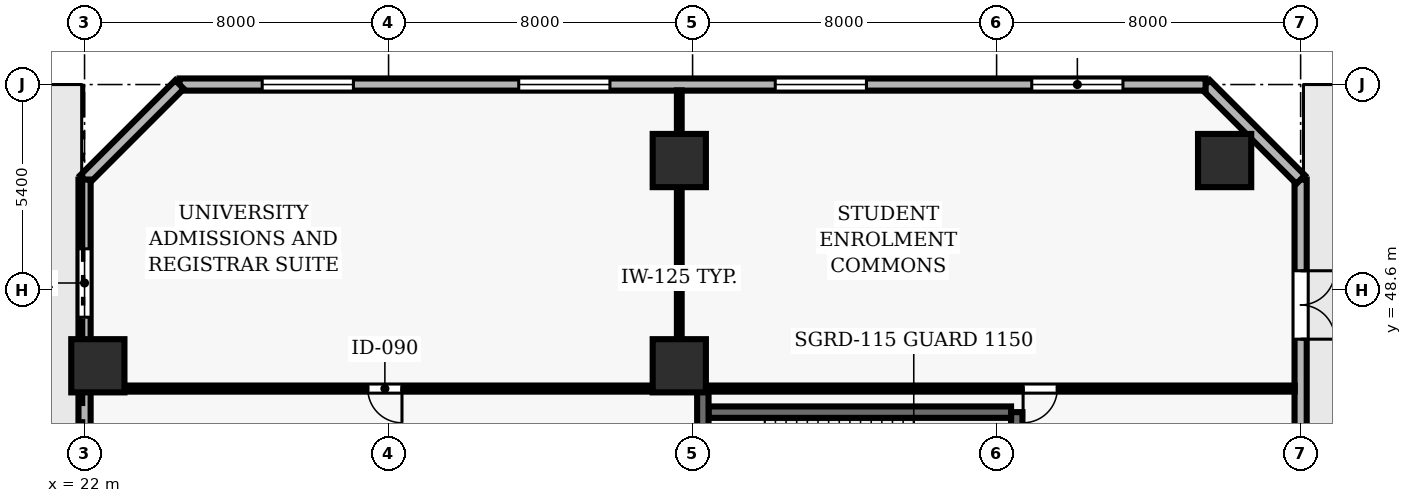
"""IFC4 building model, lengths in metres.
Left out: names, types, materials, properties, quantities, classifications, styles, units other than length and angle.
Written with IfcOpenShell. Run it as: python <this file> out.ifc"""

import sys

from ifc_helpers import new_model, si_unit, direction, frame, frame_2d, origin, origin_2d, place, context, subcontext, project, spatial, rectangle, extrude, element, fill, save


model = new_model("IFC4")
c1 = context("Model", 3, precision=1e-05, world=origin(), true_north=direction((0.0, 1.0)))
c2 = subcontext(c1, "Body", "Model", "MODEL_VIEW")
j1 = project(units=[si_unit("LENGTHUNIT", "METRE"), si_unit("PLANEANGLEUNIT", "RADIAN")], contexts=[c1])
p1 = place(None, origin())
s1 = spatial("IfcSite", under=j1, at=p1, CompositionType="ELEMENT")
p2 = place(p1, origin())
s2 = spatial("IfcBuilding", under=s1, at=p2, CompositionType="ELEMENT")
p3 = place(p2, origin())
s3 = spatial("IfcBuildingStorey", under=s2, at=p3, CompositionType="ELEMENT", Elevation=0.0)
for number, where, z_axis, x_axis in (
    (1, (22.35, 46.6, 0.0), (0.0, 0.0, 1.0), (1.0, 0.0, 0.0)),
    (2, (37.65, 46.6, 0.0), (0.0, 0.0, 1.0), (1.0, 0.0, 0.0)),
    (3, (37.65, 52.0, 0.0), (0.0, 0.0, 1.0), (1.0, 0.0, 0.0)),
    (4, (52.0, 52.0, 0.0), (0.0, 0.0, 1.0), (1.0, 0.0, 0.0)),
):
    element("IfcColumn", number, at=place(p3, frame(where, z_axis=z_axis, x_axis=x_axis)), inside=s3, PredefinedType="COLUMN", context=c2, shape_type="SweptSolid", body=[
        extrude(rectangle(XDim=1.4, YDim=1.4, at=origin_2d()), origin(), (0.0, 0.0, 1.0), 5.2),
    ])
p4 = place(p3, frame((54.0, 32.0, 0.0), z_axis=(0.0, 0.0, 1.0), x_axis=(0.0, 1.0, 0.0)))
e5 = element("IfcWall", 5, at=p4, inside=s3, PredefinedType="SOLIDWALL", context=c2, shape_type="SweptSolid", body=[
    extrude(rectangle(XDim=19.5, YDim=0.32, at=frame_2d((9.75, 0.0))), origin(), (0.0, 0.0, 1.0), 4.92),
])
p5 = place(p4, frame((1.3, 0.0, 0.0)))
e6 = element("IfcOpeningElement", 6, at=p5, cuts=e5, PredefinedType="OPENING", context=c2, shape_type="SweptSolid", body=[
    extrude(rectangle(XDim=1.8, YDim=2.4, at=frame_2d((0.9, 1.2))), frame((0.0, 0.17, 0.0), z_axis=(0.0, -1.0, 0.0), x_axis=(1.0, 0.0, 0.0)), (0.0, 0.0, 1.0), 0.34),
])
p6 = place(p4, frame((15.3, 0.0, 0.0)))
e7 = element("IfcOpeningElement", 7, at=p6, cuts=e5, PredefinedType="OPENING", context=c2, shape_type="SweptSolid", body=[
    extrude(rectangle(XDim=1.8, YDim=2.4, at=frame_2d((0.9, 1.2))), frame((0.0, 0.17, 0.0), z_axis=(0.0, -1.0, 0.0), x_axis=(1.0, 0.0, 0.0)), (0.0, 0.0, 1.0), 0.34),
])
p7 = place(p4, frame((9.0, 0.0, 0.9)))
e8 = element("IfcOpeningElement", 8, at=p7, cuts=e5, PredefinedType="OPENING", context=c2, shape_type="SweptSolid", body=[
    extrude(rectangle(XDim=1.5, YDim=1.8, at=frame_2d((0.75, 0.9))), frame((0.0, 0.17, 0.0), z_axis=(0.0, -1.0, 0.0), x_axis=(1.0, 0.0, 0.0)), (0.0, 0.0, 1.0), 0.34),
])
p8 = place(p3, frame((54.0, 51.5, 0.0), z_axis=(0.0, 0.0, 1.0), x_axis=(-0.707106781187, 0.707106781187, 0.0)))
e9 = element("IfcWall", 9, at=p8, inside=s3, PredefinedType="SOLIDWALL", context=c2, shape_type="SweptSolid", body=[
    extrude(rectangle(XDim=3.536, YDim=0.32, at=frame_2d((1.768, 0.0))), origin(), (0.0, 0.0, 1.0), 4.92),
])
p9 = place(p3, frame((51.5, 54.0, 0.0), z_axis=(0.0, 0.0, 1.0), x_axis=(-1.0, 0.0, 0.0)))
e10 = element("IfcWall", 10, at=p9, inside=s3, PredefinedType="SOLIDWALL", context=c2, shape_type="SweptSolid", body=[
    extrude(rectangle(XDim=27.0, YDim=0.32, at=frame_2d((13.5, 0.0))), origin(), (0.0, 0.0, 1.0), 4.92),
])
p10 = place(p9, frame((2.175, 0.0, 0.9)))
e11 = element("IfcOpeningElement", 11, at=p10, cuts=e10, PredefinedType="OPENING", context=c2, shape_type="SweptSolid", body=[
    extrude(rectangle(XDim=2.4, YDim=1.8, at=frame_2d((1.2, 0.9))), frame((0.0, 0.17, 0.0), z_axis=(0.0, -1.0, 0.0), x_axis=(1.0, 0.0, 0.0)), (0.0, 0.0, 1.0), 0.34),
])
p11 = place(p9, frame((8.925, 0.0, 0.9)))
e12 = element("IfcOpeningElement", 12, at=p11, cuts=e10, PredefinedType="OPENING", context=c2, shape_type="SweptSolid", body=[
    extrude(rectangle(XDim=2.4, YDim=1.8, at=frame_2d((1.2, 0.9))), frame((0.0, 0.17, 0.0), z_axis=(0.0, -1.0, 0.0), x_axis=(1.0, 0.0, 0.0)), (0.0, 0.0, 1.0), 0.34),
])
p12 = place(p9, frame((15.675, 0.0, 0.9)))
e13 = element("IfcOpeningElement", 13, at=p12, cuts=e10, PredefinedType="OPENING", context=c2, shape_type="SweptSolid", body=[
    extrude(rectangle(XDim=2.4, YDim=1.8, at=frame_2d((1.2, 0.9))), frame((0.0, 0.17, 0.0), z_axis=(0.0, -1.0, 0.0), x_axis=(1.0, 0.0, 0.0)), (0.0, 0.0, 1.0), 0.34),
])
p13 = place(p9, frame((22.425, 0.0, 0.9)))
e14 = element("IfcOpeningElement", 14, at=p13, cuts=e10, PredefinedType="OPENING", context=c2, shape_type="SweptSolid", body=[
    extrude(rectangle(XDim=2.4, YDim=1.8, at=frame_2d((1.2, 0.9))), frame((0.0, 0.17, 0.0), z_axis=(0.0, -1.0, 0.0), x_axis=(1.0, 0.0, 0.0)), (0.0, 0.0, 1.0), 0.34),
])
p14 = place(p3, frame((24.5, 54.0, 0.0), z_axis=(0.0, 0.0, 1.0), x_axis=(-0.707106781187, -0.707106781187, 0.0)))
e15 = element("IfcWall", 15, at=p14, inside=s3, PredefinedType="SOLIDWALL", context=c2, shape_type="SweptSolid", body=[
    extrude(rectangle(XDim=3.536, YDim=0.32, at=frame_2d((1.768, 0.0))), origin(), (0.0, 0.0, 1.0), 4.92),
])
p15 = place(p3, frame((22.0, 51.5, 0.0), z_axis=(0.0, 0.0, 1.0), x_axis=(0.0, -1.0, 0.0)))
e16 = element("IfcWall", 16, at=p15, inside=s3, PredefinedType="SOLIDWALL", context=c2, shape_type="SweptSolid", body=[
    extrude(rectangle(XDim=49.0, YDim=0.32, at=frame_2d((24.5, 0.0))), origin(), (0.0, 0.0, 1.0), 4.92),
])
p16 = place(p15, frame((11.4, 0.0, 0.0)))
e17 = element("IfcOpeningElement", 17, at=p16, cuts=e16, PredefinedType="OPENING", context=c2, shape_type="SweptSolid", body=[
    extrude(rectangle(XDim=1.8, YDim=2.4, at=frame_2d((0.9, 1.2))), frame((0.0, 0.17, 0.0), z_axis=(0.0, -1.0, 0.0), x_axis=(1.0, 0.0, 0.0)), (0.0, 0.0, 1.0), 0.34),
])
p17 = place(p15, frame((18.4, 0.0, 0.0)))
e18 = element("IfcOpeningElement", 18, at=p17, cuts=e16, PredefinedType="OPENING", context=c2, shape_type="SweptSolid", body=[
    extrude(rectangle(XDim=1.8, YDim=2.4, at=frame_2d((0.9, 1.2))), frame((0.0, 0.17, 0.0), z_axis=(0.0, -1.0, 0.0), x_axis=(1.0, 0.0, 0.0)), (0.0, 0.0, 1.0), 0.34),
])
p18 = place(p15, frame((1.822, 0.0, 0.9)))
e19 = element("IfcOpeningElement", 19, at=p18, cuts=e16, PredefinedType="OPENING", context=c2, shape_type="SweptSolid", body=[
    extrude(rectangle(XDim=1.8, YDim=2.2, at=frame_2d((0.9, 1.1))), frame((0.0, 0.17, 0.0), z_axis=(0.0, -1.0, 0.0), x_axis=(1.0, 0.0, 0.0)), (0.0, 0.0, 1.0), 0.34),
])
p19 = place(p15, frame((7.267, 0.0, 0.9)))
e20 = element("IfcOpeningElement", 20, at=p19, cuts=e16, PredefinedType="OPENING", context=c2, shape_type="SweptSolid", body=[
    extrude(rectangle(XDim=1.8, YDim=2.2, at=frame_2d((0.9, 1.1))), frame((0.0, 0.17, 0.0), z_axis=(0.0, -1.0, 0.0), x_axis=(1.0, 0.0, 0.0)), (0.0, 0.0, 1.0), 0.34),
])
p20 = place(p15, frame((23.15, 0.0, 0.9)))
e21 = element("IfcOpeningElement", 21, at=p20, cuts=e16, PredefinedType="OPENING", context=c2, shape_type="SweptSolid", body=[
    extrude(rectangle(XDim=1.8, YDim=2.2, at=frame_2d((0.9, 1.1))), frame((0.0, 0.17, 0.0), z_axis=(0.0, -1.0, 0.0), x_axis=(1.0, 0.0, 0.0)), (0.0, 0.0, 1.0), 0.34),
])
p21 = place(p15, frame((29.494, 0.0, 0.9)))
e22 = element("IfcOpeningElement", 22, at=p21, cuts=e16, PredefinedType="OPENING", context=c2, shape_type="SweptSolid", body=[
    extrude(rectangle(XDim=1.8, YDim=2.2, at=frame_2d((0.9, 1.1))), frame((0.0, 0.17, 0.0), z_axis=(0.0, -1.0, 0.0), x_axis=(1.0, 0.0, 0.0)), (0.0, 0.0, 1.0), 0.34),
])
p22 = place(p15, frame((34.039, 0.0, 0.9)))
e23 = element("IfcOpeningElement", 23, at=p22, cuts=e16, PredefinedType="OPENING", context=c2, shape_type="SweptSolid", body=[
    extrude(rectangle(XDim=1.8, YDim=2.2, at=frame_2d((0.9, 1.1))), frame((0.0, 0.17, 0.0), z_axis=(0.0, -1.0, 0.0), x_axis=(1.0, 0.0, 0.0)), (0.0, 0.0, 1.0), 0.34),
])
p23 = place(p15, frame((39.933, 0.0, 0.9)))
e24 = element("IfcOpeningElement", 24, at=p23, cuts=e16, PredefinedType="OPENING", context=c2, shape_type="SweptSolid", body=[
    extrude(rectangle(XDim=1.8, YDim=2.2, at=frame_2d((0.9, 1.1))), frame((0.0, 0.17, 0.0), z_axis=(0.0, -1.0, 0.0), x_axis=(1.0, 0.0, 0.0)), (0.0, 0.0, 1.0), 0.34),
])
p24 = place(p3, frame((46.53, 41.97, 0.0), z_axis=(0.0, 0.0, 1.0), x_axis=(0.0, 1.0, 0.0)))
e25 = element("IfcWall", 25, at=p24, inside=s3, PredefinedType="SHEAR", context=c2, shape_type="SweptSolid", body=[
    extrude(rectangle(XDim=3.41, YDim=0.3, at=frame_2d((1.705, 0.0))), origin(), (0.0, 0.0, 1.0), 4.92),
])
p25 = place(p3, frame((46.38, 45.38, 0.0), z_axis=(0.0, 0.0, 1.0), x_axis=(-1.0, 0.0, 0.0)))
e26 = element("IfcWall", 26, at=p25, inside=s3, PredefinedType="SHEAR", context=c2, shape_type="SweptSolid", body=[
    extrude(rectangle(XDim=7.96, YDim=0.3, at=frame_2d((3.98, 0.0))), origin(), (0.0, 0.0, 1.0), 4.92),
])
p26 = place(p3, frame((38.27, 45.92, 0.0), z_axis=(0.0, 0.0, 1.0), x_axis=(0.0, -1.0, 0.0)))
e27 = element("IfcWall", 27, at=p26, inside=s3, PredefinedType="SHEAR", context=c2, shape_type="SweptSolid", body=[
    extrude(rectangle(XDim=3.95, YDim=0.3, at=frame_2d((1.975, 0.0))), origin(), (0.0, 0.0, 1.0), 4.92),
])
p27 = place(p26, frame((1.67, 0.0, 0.0)))
e28 = element("IfcOpeningElement", 28, at=p27, cuts=e27, PredefinedType="OPENING", context=c2, shape_type="SweptSolid", body=[
    extrude(rectangle(XDim=1.15, YDim=2.15, at=frame_2d((0.575, 1.075))), frame((0.0, 0.16, 0.0), z_axis=(0.0, -1.0, 0.0), x_axis=(1.0, 0.0, 0.0)), (0.0, 0.0, 1.0), 0.32),
])
p28 = place(p3, frame((37.65, 46.0, 0.0), z_axis=(0.0, 0.0, 1.0), x_axis=(-1.0, 0.0, 0.0)))
e29 = element("IfcWall", 29, at=p28, inside=s3, PredefinedType="PARTITIONING", context=c2, shape_type="SweptSolid", body=[
    extrude(rectangle(XDim=15.495, YDim=0.16, at=frame_2d((7.748, 0.0))), origin(), (0.0, 0.0, 1.0), 4.92),
])
p29 = place(p28, frame((7.297, 0.0, 0.0)))
e30 = element("IfcOpeningElement", 30, at=p29, cuts=e29, PredefinedType="OPENING", context=c2, shape_type="SweptSolid", body=[
    extrude(rectangle(XDim=0.9, YDim=2.1, at=frame_2d((0.45, 1.05))), frame((0.0, 0.09, 0.0), z_axis=(0.0, -1.0, 0.0), x_axis=(1.0, 0.0, 0.0)), (0.0, 0.0, 1.0), 0.18),
])
p30 = place(p3, frame((53.845, 46.0, 0.0), z_axis=(0.0, 0.0, 1.0), x_axis=(-1.0, 0.0, 0.0)))
e31 = element("IfcWall", 31, at=p30, inside=s3, PredefinedType="PARTITIONING", context=c2, shape_type="SweptSolid", body=[
    extrude(rectangle(XDim=16.195, YDim=0.16, at=frame_2d((8.098, 0.0))), origin(), (0.0, 0.0, 1.0), 4.92),
])
p31 = place(p30, frame((6.248, 0.0, 0.0)))
e32 = element("IfcOpeningElement", 32, at=p31, cuts=e31, PredefinedType="OPENING", context=c2, shape_type="SweptSolid", body=[
    extrude(rectangle(XDim=0.9, YDim=2.1, at=frame_2d((0.45, 1.05))), frame((0.0, 0.09, 0.0), z_axis=(0.0, -1.0, 0.0), x_axis=(1.0, 0.0, 0.0)), (0.0, 0.0, 1.0), 0.18),
])
p32 = place(p3, frame((37.65, 46.075, 0.0), z_axis=(0.0, 0.0, 1.0), x_axis=(0.0, 1.0, 0.0)))
e33 = element("IfcWall", 33, at=p32, inside=s3, PredefinedType="PARTITIONING", context=c2, shape_type="SweptSolid", body=[
    extrude(rectangle(XDim=7.77, YDim=0.125, at=frame_2d((3.885, 0.0))), origin(), (0.0, 0.0, 1.0), 4.065),
])
p33 = place(p6, origin())
e34 = element("IfcDoor", 34, at=p33, inside=s3, OperationType="DOUBLE_DOOR_SINGLE_SWING", PredefinedType="DOOR", context=c2, shape_type="SweptSolid", body=[
    extrude(rectangle(XDim=1.8, YDim=2.4, at=frame_2d((0.9, 1.2))), frame((0.0, 0.025, 0.0), z_axis=(0.0, -1.0, 0.0), x_axis=(1.0, 0.0, 0.0)), (0.0, 0.0, 1.0), 0.05),
])
fill(e7, e34)
p34 = place(p10, origin())
e35 = element("IfcWindow", 35, at=p34, inside=s3, PartitioningType="SINGLE_PANEL", PredefinedType="WINDOW", context=c2, shape_type="SweptSolid", body=[
    extrude(rectangle(XDim=2.4, YDim=1.8, at=frame_2d((1.2, 0.9))), frame((0.0, 0.03, 0.0), z_axis=(0.0, -1.0, 0.0), x_axis=(1.0, 0.0, 0.0)), (0.0, 0.0, 1.0), 0.06),
])
fill(e11, e35)
p35 = place(p11, origin())
e36 = element("IfcWindow", 36, at=p35, inside=s3, PartitioningType="SINGLE_PANEL", PredefinedType="WINDOW", context=c2, shape_type="SweptSolid", body=[
    extrude(rectangle(XDim=2.4, YDim=1.8, at=frame_2d((1.2, 0.9))), frame((0.0, 0.03, 0.0), z_axis=(0.0, -1.0, 0.0), x_axis=(1.0, 0.0, 0.0)), (0.0, 0.0, 1.0), 0.06),
])
fill(e12, e36)
p36 = place(p12, origin())
e37 = element("IfcWindow", 37, at=p36, inside=s3, PartitioningType="SINGLE_PANEL", PredefinedType="WINDOW", context=c2, shape_type="SweptSolid", body=[
    extrude(rectangle(XDim=2.4, YDim=1.8, at=frame_2d((1.2, 0.9))), frame((0.0, 0.03, 0.0), z_axis=(0.0, -1.0, 0.0), x_axis=(1.0, 0.0, 0.0)), (0.0, 0.0, 1.0), 0.06),
])
fill(e13, e37)
p37 = place(p13, origin())
e38 = element("IfcWindow", 38, at=p37, inside=s3, PartitioningType="SINGLE_PANEL", PredefinedType="WINDOW", context=c2, shape_type="SweptSolid", body=[
    extrude(rectangle(XDim=2.4, YDim=1.8, at=frame_2d((1.2, 0.9))), frame((0.0, 0.03, 0.0), z_axis=(0.0, -1.0, 0.0), x_axis=(1.0, 0.0, 0.0)), (0.0, 0.0, 1.0), 0.06),
])
fill(e14, e38)
p38 = place(p18, origin())
e39 = element("IfcWindow", 39, at=p38, inside=s3, PartitioningType="SINGLE_PANEL", PredefinedType="WINDOW", context=c2, shape_type="SweptSolid", body=[
    extrude(rectangle(XDim=1.8, YDim=2.2, at=frame_2d((0.9, 1.1))), frame((0.0, 0.03, 0.0), z_axis=(0.0, -1.0, 0.0), x_axis=(1.0, 0.0, 0.0)), (0.0, 0.0, 1.0), 0.06),
])
fill(e19, e39)
p39 = place(p29, origin())
e40 = element("IfcDoor", 40, at=p39, inside=s3, OperationType="SINGLE_SWING_LEFT", PredefinedType="DOOR", context=c2, shape_type="SweptSolid", body=[
    extrude(rectangle(XDim=0.9, YDim=2.1, at=frame_2d((0.45, 1.05))), frame((0.0, 0.025, 0.0), z_axis=(0.0, -1.0, 0.0), x_axis=(1.0, 0.0, 0.0)), (0.0, 0.0, 1.0), 0.05),
])
fill(e30, e40)
p40 = place(p31, origin())
e41 = element("IfcDoor", 41, at=p40, inside=s3, OperationType="SINGLE_SWING_RIGHT", PredefinedType="DOOR", context=c2, shape_type="SweptSolid", body=[
    extrude(rectangle(XDim=0.9, YDim=2.1, at=frame_2d((0.45, 1.05))), frame((0.0, 0.025, 0.0), z_axis=(0.0, -1.0, 0.0), x_axis=(1.0, 0.0, 0.0)), (0.0, 0.0, 1.0), 0.05),
])
fill(e32, e41)
save(model, sys.argv[1])
